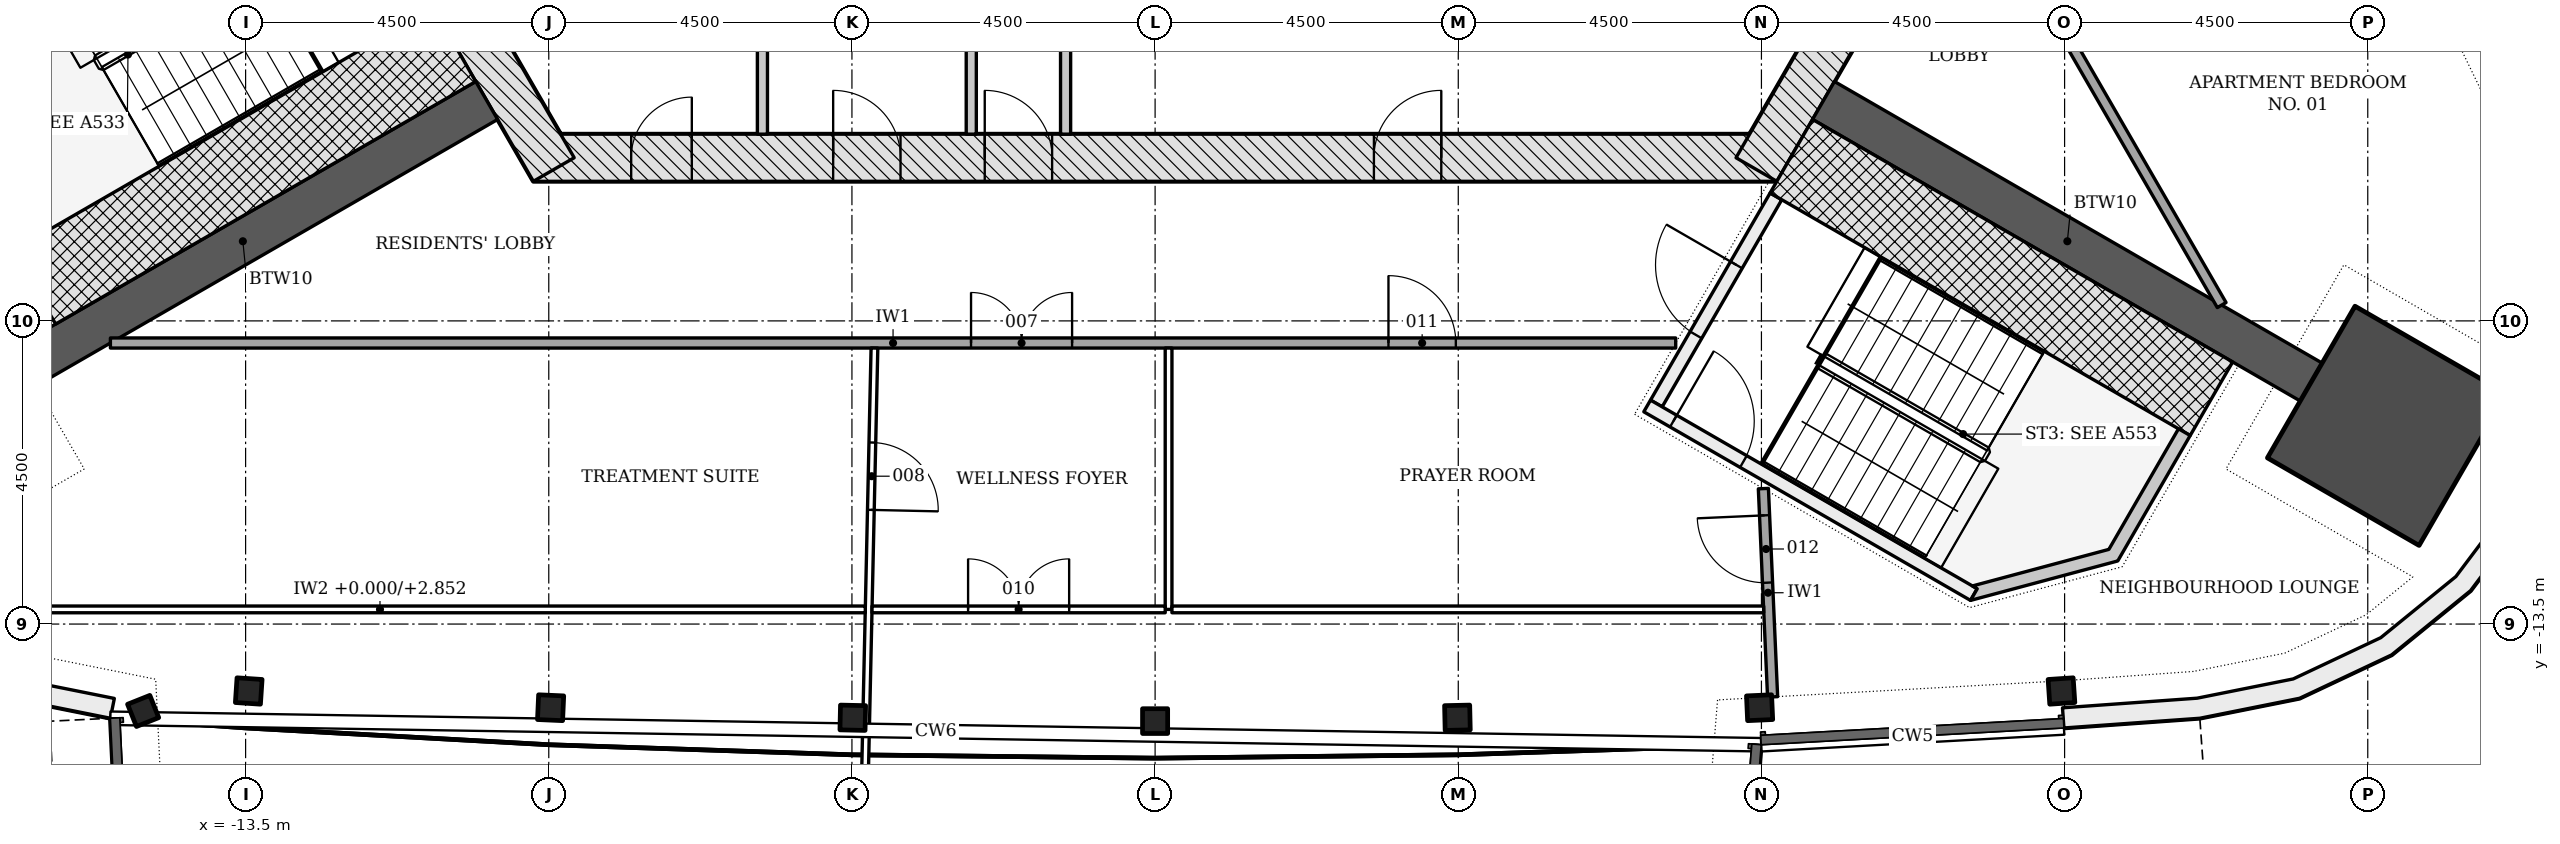
"""IFC4 building model, lengths in metres.
Left out: names, types, materials, properties, quantities, classifications, styles, units other than length and angle.
Written with IfcOpenShell. Run it as: python <this file> out.ifc"""

import sys

from ifc_helpers import new_model, si_unit, direction, frame, frame_2d, origin, origin_2d, place, context, subcontext, project, spatial, polyline, rectangle, hollow_rectangle, i_section, outline, extrude, element, fill, save


model = new_model("IFC4")
c1 = context("Model", 3, precision=1e-05, world=origin(), true_north=direction((0.0, 1.0)))
c2 = subcontext(c1, "Body", "Model", "MODEL_VIEW")
j1 = project(units=[si_unit("LENGTHUNIT", "METRE"), si_unit("PLANEANGLEUNIT", "RADIAN")], contexts=[c1])
p1 = place(None, origin())
s1 = spatial("IfcSite", under=j1, at=p1, CompositionType="ELEMENT")
p2 = place(p1, origin())
s2 = spatial("IfcBuilding", under=s1, at=p2, CompositionType="ELEMENT")
p3 = place(p2, frame((0.0, 0.0, 214.8)))
s3 = spatial("IfcBuildingStorey", under=s2, at=p3, CompositionType="ELEMENT", Elevation=214.8)
p4 = place(p3, frame((-9.229, -6.578, -0.2), z_axis=(0.0, 0.0, 1.0), x_axis=(1.0, 0.0, 0.0)))
e1 = element("IfcWall", 1, at=p4, inside=s3, PredefinedType="SHEAR", context=c2, shape_type="SweptSolid", body=[
    extrude(rectangle(XDim=18.458, YDim=0.7, at=frame_2d((9.229, 0.0))), origin(), (0.0, 0.0, 1.0), 3.6),
])
p5 = place(p4, frame((6.7, 0.0, 0.2)))
e2 = element("IfcOpeningElement", 2, at=p5, cuts=e1, PredefinedType="OPENING", context=c2, shape_type="SweptSolid", body=[
    extrude(rectangle(XDim=1.0, YDim=2.1, at=frame_2d((0.5, 1.05))), frame((0.0, 0.36, 0.0), z_axis=(0.0, -1.0, 0.0), x_axis=(1.0, 0.0, 0.0)), (0.0, 0.0, 1.0), 0.72),
])
p6 = place(p4, frame((1.452, 0.0, 0.2)))
e3 = element("IfcOpeningElement", 3, at=p6, cuts=e1, PredefinedType="OPENING", context=c2, shape_type="SweptSolid", body=[
    extrude(rectangle(XDim=0.9, YDim=2.1, at=frame_2d((0.45, 1.05))), frame((0.0, 0.36, 0.0), z_axis=(0.0, -1.0, 0.0), x_axis=(1.0, 0.0, 0.0)), (0.0, 0.0, 1.0), 0.72),
])
p7 = place(p4, frame((4.45, 0.0, 0.2)))
e4 = element("IfcOpeningElement", 4, at=p7, cuts=e1, PredefinedType="OPENING", context=c2, shape_type="SweptSolid", body=[
    extrude(rectangle(XDim=1.0, YDim=2.1, at=frame_2d((0.5, 1.05))), frame((0.0, 0.36, 0.0), z_axis=(0.0, -1.0, 0.0), x_axis=(1.0, 0.0, 0.0)), (0.0, 0.0, 1.0), 0.72),
])
p8 = place(p4, frame((12.477, 0.0, 0.2)))
e5 = element("IfcOpeningElement", 5, at=p8, cuts=e1, PredefinedType="OPENING", context=c2, shape_type="SweptSolid", body=[
    extrude(rectangle(XDim=1.0, YDim=2.1, at=frame_2d((0.5, 1.05))), frame((0.0, 0.36, 0.0), z_axis=(0.0, -1.0, 0.0), x_axis=(1.0, 0.0, 0.0)), (0.0, 0.0, 1.0), 0.72),
])
for number, where, z_axis, x_axis in (
    (6, (8.926, -6.753, -0.2), (0.0, 0.0, 1.0), (0.5, 0.866, 0.0)),
    (7, (-10.311, -4.353, -0.2), (0.0, 0.0, 1.0), (0.5, -0.866, 0.0)),
):
    element("IfcWall", number, at=place(p3, frame(where, z_axis=z_axis, x_axis=x_axis)), inside=s3, PredefinedType="SHEAR", context=c2, shape_type="SweptSolid", body=[
        extrude(rectangle(XDim=2.771, YDim=0.7, at=frame_2d((1.386, 0.0))), origin(), (0.0, 0.0, 1.0), 3.6),
    ])
for number, where, z_axis, x_axis in (
    (8, (-9.922, -5.728, -0.2), (0.0, 0.0, 1.0), (-0.866, -0.5, 0.0)),
    (9, (9.922, -5.728, -0.2), (0.0, 0.0, 1.0), (0.866, -0.5, 0.0)),
):
    element("IfcWall", number, at=place(p3, frame(where, z_axis=z_axis, x_axis=x_axis)), inside=s3, PredefinedType="SHEAR", context=c2, shape_type="SweptSolid", body=[
        extrude(rectangle(XDim=8.359, YDim=0.65, at=frame_2d((4.179, 0.0))), origin(), (0.0, 0.0, 1.0), 3.6),
    ])
p9 = place(p3, frame((18.286, -10.558, -0.2), z_axis=(0.0, 0.0, 1.0), x_axis=(0.866025403784, -0.5, 0.0)))
e10 = element("IfcColumn", 10, at=p9, inside=s3, PredefinedType="COLUMN", context=c2, shape_type="SweptSolid", body=[
    extrude(rectangle(XDim=2.6, YDim=2.6, at=origin_2d()), origin(), (0.0, 0.0, 1.0), 3.6),
])
for number, where, z_axis, x_axis in (
    (11, (-13.454, -14.494, -0.2), (0.0, 0.0, 1.0), (0.998, -0.066, 0.0)),
    (12, (-8.973, -14.742, -0.2), (0.0, 0.0, 1.0), (0.999, -0.044, 0.0)),
    (13, (-4.488, -14.891, -0.2), (0.0, 0.0, 1.0), (1.0, -0.022, 0.0)),
    (14, (0.0, -14.94, -0.2), (0.0, 0.0, 1.0), (1.0, 0.0, 0.0)),
    (15, (4.488, -14.891, -0.2), (0.0, 0.0, 1.0), (1.0, 0.022, 0.0)),
    (16, (8.973, -14.742, -0.2), (0.0, 0.0, 1.0), (0.999, 0.044, 0.0)),
    (17, (13.454, -14.494, -0.2), (0.0, 0.0, 1.0), (0.998, 0.066, 0.0)),
):
    element("IfcColumn", number, at=place(p3, frame(where, z_axis=z_axis, x_axis=x_axis)), inside=s3, PredefinedType="COLUMN", context=c2, shape_type="SweptSolid", body=[
        extrude(i_section(OverallWidth=0.373, OverallDepth=0.368, WebThickness=0.015, FlangeThickness=0.024, FilletRadius=0.015, at=origin_2d()), origin(), (0.0, 0.0, 1.0), 3.6),
    ])
p10 = place(p3, frame((-15.021, -14.79, -0.2), z_axis=(0.0, 0.0, 1.0), x_axis=(0.370053104001, -0.929010602856, 0.0)))
e18 = element("IfcColumn", 18, at=p10, inside=s3, PredefinedType="COLUMN", context=c2, shape_type="SweptSolid", body=[
    extrude(hollow_rectangle(XDim=0.356, YDim=0.356, WallThickness=0.013, at=origin_2d()), origin(), (0.0, 0.0, 1.0), 3.6),
])
p11 = place(p3, origin())
e19 = element("IfcWall", 19, at=p11, inside=s3, PredefinedType="NOTDEFINED", context=c2, shape_type="SweptSolid", body=[
    extrude(outline(polyline([(-18.354, -13.958), (-16.988, -14.602), (-15.507, -14.898), (-15.448, -14.604), (-16.893, -14.315), (-18.227, -13.686), (-18.354, -13.958)])), origin(), (0.0, 0.0, 1.0), 3.3),
])
p12 = place(p3, origin())
e20 = element("IfcWall", 20, at=p12, inside=s3, PredefinedType="NOTDEFINED", context=c2, shape_type="SweptSolid", body=[
    extrude(outline(polyline([(13.49, -15.042), (15.507, -14.898), (16.988, -14.602), (18.354, -13.958), (19.526, -13.004), (20.434, -11.797), (21.025, -10.408), (21.265, -8.917), (21.139, -7.411), (20.656, -5.98), (19.772, -4.162), (19.502, -4.293), (20.378, -6.094), (20.844, -7.473), (20.963, -8.905), (20.735, -10.324), (20.172, -11.646), (19.308, -12.795), (18.193, -13.702), (16.893, -14.315), (15.467, -14.6), (13.469, -14.743), (13.49, -15.042)])), origin(), (0.0, 0.0, 1.0), 3.3),
])
p13 = place(p3, frame((-5.829, -3.492, 0.0), z_axis=(0.0, 0.0, 1.0), x_axis=(0.0, -1.0, 0.0)))
e21 = element("IfcWall", 21, at=p13, inside=s3, PredefinedType="PARTITIONING", context=c2, shape_type="SweptSolid", body=[
    extrude(rectangle(XDim=2.736, YDim=0.15, at=frame_2d((1.368, 0.0))), origin(), (0.0, 0.0, 1.0), 3.4),
])
p14 = place(p3, frame((-2.729, 1.3, 0.0), z_axis=(0.0, 0.0, 1.0), x_axis=(0.0, -1.0, 0.0)))
e22 = element("IfcWall", 22, at=p14, inside=s3, PredefinedType="PARTITIONING", context=c2, shape_type="SweptSolid", body=[
    extrude(rectangle(XDim=7.528, YDim=0.15, at=frame_2d((3.764, 0.0))), origin(), (0.0, 0.0, 1.0), 3.4),
])
p15 = place(p14, frame((1.915, 0.0, 0.0)))
e23 = element("IfcOpeningElement", 23, at=p15, cuts=e22, PredefinedType="OPENING", context=c2, shape_type="SweptSolid", body=[
    extrude(rectangle(XDim=0.9, YDim=2.1, at=frame_2d((0.45, 1.05))), frame((0.0, 0.085, 0.0), z_axis=(0.0, -1.0, 0.0), x_axis=(1.0, 0.0, 0.0)), (0.0, 0.0, 1.0), 0.17),
])
p16 = place(p3, frame((-1.329, 1.597, 0.0), z_axis=(0.0, 0.0, 1.0), x_axis=(0.0, -1.0, 0.0)))
e24 = element("IfcWall", 24, at=p16, inside=s3, PredefinedType="PARTITIONING", context=c2, shape_type="SweptSolid", body=[
    extrude(rectangle(XDim=7.825, YDim=0.15, at=frame_2d((3.913, 0.0))), origin(), (0.0, 0.0, 1.0), 3.4),
])
p17 = place(p16, frame((2.063, 0.0, 0.0)))
e25 = element("IfcOpeningElement", 25, at=p17, cuts=e24, PredefinedType="OPENING", context=c2, shape_type="SweptSolid", body=[
    extrude(rectangle(XDim=0.9, YDim=2.1, at=frame_2d((0.45, 1.05))), frame((0.0, 0.085, 0.0), z_axis=(0.0, -1.0, 0.0), x_axis=(1.0, 0.0, 0.0)), (0.0, 0.0, 1.0), 0.17),
])
p18 = place(p3, frame((-10.399, -4.901, -0.2), z_axis=(0.0, 0.0, 1.0), x_axis=(-0.866018442252, -0.500012057535, 0.0)))
e26 = element("IfcWall", 26, at=p18, inside=s3, PredefinedType="SHEAR", context=c2, shape_type="SweptSolid", body=[
    extrude(rectangle(XDim=7.2, YDim=1.261, at=frame_2d((3.6, 0.0))), origin(), (0.0, 0.0, 1.0), 3.6),
])
p19 = place(p3, frame((7.44, -10.226, -0.2), z_axis=(0.0, 0.0, 1.0), x_axis=(0.500022077904, 0.866012656725, 0.0)))
e27 = element("IfcWall", 27, at=p19, inside=s3, PredefinedType="SHEAR", context=c2, shape_type="SweptSolid", body=[
    extrude(rectangle(XDim=3.55, YDim=0.2, at=frame_2d((1.775, 0.0))), origin(), (0.0, 0.0, 1.0), 3.6),
])
p20 = place(p19, frame((1.175, 0.0, 0.2)))
e28 = element("IfcOpeningElement", 28, at=p20, cuts=e27, PredefinedType="OPENING", context=c2, shape_type="SweptSolid", body=[
    extrude(rectangle(XDim=1.2, YDim=2.1, at=frame_2d((0.6, 1.05))), frame((0.0, 0.11, 0.0), z_axis=(0.0, -1.0, 0.0), x_axis=(1.0, 0.0, 0.0)), (0.0, 0.0, 1.0), 0.22),
])
p21 = place(p3, frame((7.304, -10.262, -0.2), z_axis=(0.0, 0.0, 1.0), x_axis=(0.866026594901, -0.49999793692, 0.0)))
e29 = element("IfcWall", 29, at=p21, inside=s3, PredefinedType="SHEAR", context=c2, shape_type="SweptSolid", body=[
    extrude(rectangle(XDim=5.6, YDim=0.2, at=frame_2d((2.8, 0.0))), origin(), (0.0, 0.0, 1.0), 3.6),
])
p22 = place(p21, frame((0.45, 0.0, 0.2)))
e30 = element("IfcOpeningElement", 30, at=p22, cuts=e29, PredefinedType="OPENING", context=c2, shape_type="SweptSolid", body=[
    extrude(rectangle(XDim=1.2, YDim=2.1, at=frame_2d((0.6, 1.05))), frame((0.0, 0.11, 0.0), z_axis=(0.0, -1.0, 0.0), x_axis=(1.0, 0.0, 0.0)), (0.0, 0.0, 1.0), 0.22),
])
p23 = place(p3, frame((9.444, -6.555, -0.2), z_axis=(0.0, 0.0, 1.0), x_axis=(0.866018442252, -0.500012057535, 0.0)))
e31 = element("IfcWall", 31, at=p23, inside=s3, PredefinedType="SHEAR", context=c2, shape_type="SweptSolid", body=[
    extrude(rectangle(XDim=7.2, YDim=1.261, at=frame_2d((3.6, 0.0))), origin(), (0.0, 0.0, 1.0), 3.6),
])
p24 = place(p3, frame((0.0, 0.0, -0.2)))
e32 = element("IfcWall", 32, at=p24, inside=s3, PredefinedType="SHEAR", context=c2, shape_type="SweptSolid", body=[
    extrude(outline(polyline([(12.104, -13.149), (14.289, -12.563), (15.364, -10.701), (15.191, -10.601), (14.157, -12.392), (12.132, -12.934), (12.204, -12.976), (12.204, -12.976), (12.204, -12.976), (12.204, -12.976), (12.204, -12.976), (12.204, -12.976), (12.204, -12.976), (12.204, -12.976), (12.204, -12.976), (12.204, -12.976), (12.204, -12.976), (12.204, -12.976), (12.204, -12.976), (12.204, -12.976), (12.204, -12.976), (12.204, -12.976), (12.204, -12.976), (12.104, -13.149)])), origin(), (0.0, 0.0, 1.0), 3.6),
])
p25 = place(p3, frame((15.832, -8.765, 0.0), z_axis=(0.0, 0.0, 1.0), x_axis=(-0.500005035328, 0.866022496617, 0.0)))
e33 = element("IfcWall", 33, at=p25, inside=s3, PredefinedType="PARTITIONING", context=c2, shape_type="SweptSolid", body=[
    extrude(rectangle(XDim=11.343, YDim=0.15, at=frame_2d((5.671, 0.0))), origin(), (0.0, 0.0, 1.0), 2.852),
])
p26 = place(p3, frame((-15.507, -9.328, 0.0), z_axis=(0.0, 0.0, 1.0), x_axis=(1.0, 0.0, 0.0)))
e34 = element("IfcWall", 34, at=p26, inside=s3, PredefinedType="PARTITIONING", context=c2, shape_type="SweptSolid", body=[
    extrude(rectangle(XDim=23.234, YDim=0.15, at=frame_2d((11.617, 0.0))), origin(), (0.0, 0.0, 1.0), 2.852),
])
p27 = place(p26, frame((12.775, 0.0, 0.0)))
e35 = element("IfcOpeningElement", 35, at=p27, cuts=e34, PredefinedType="OPENING", context=c2, shape_type="SweptSolid", body=[
    extrude(rectangle(XDim=1.5, YDim=2.1, at=frame_2d((0.75, 1.05))), frame((0.0, 0.085, 0.0), z_axis=(0.0, -1.0, 0.0), x_axis=(1.0, 0.0, 0.0)), (0.0, 0.0, 1.0), 0.17),
])
p28 = place(p26, frame((18.971, 0.0, 0.0)))
e36 = element("IfcOpeningElement", 36, at=p28, cuts=e34, PredefinedType="OPENING", context=c2, shape_type="SweptSolid", body=[
    extrude(rectangle(XDim=1.0, YDim=2.1, at=frame_2d((0.5, 1.05))), frame((0.0, 0.085, 0.0), z_axis=(0.0, -1.0, 0.0), x_axis=(1.0, 0.0, 0.0)), (0.0, 0.0, 1.0), 0.17),
])
p29 = place(p3, frame((9.166, -14.581, 0.0), z_axis=(0.0, 0.0, 1.0), x_axis=(-0.044258886008, 0.999020095398, 0.0)))
e37 = element("IfcWall", 37, at=p29, inside=s3, PredefinedType="PARTITIONING", context=c2, shape_type="SweptSolid", body=[
    extrude(rectangle(XDim=3.094, YDim=0.15, at=frame_2d((1.547, 0.0))), origin(), (0.0, 0.0, 1.0), 3.4),
])
p30 = place(p29, frame((1.697, 0.0, 0.0)))
e38 = element("IfcOpeningElement", 38, at=p30, cuts=e37, PredefinedType="OPENING", context=c2, shape_type="SweptSolid", body=[
    extrude(rectangle(XDim=1.0, YDim=2.1, at=frame_2d((0.5, 1.05))), frame((0.0, 0.085, 0.0), z_axis=(0.0, -1.0, 0.0), x_axis=(1.0, 0.0, 0.0)), (0.0, 0.0, 1.0), 0.17),
])
p31 = place(p3, frame((-4.166, -9.403, 0.0), z_axis=(0.0, 0.0, 1.0), x_axis=(-0.022131761569, -0.999755062568, 0.0)))
e39 = element("IfcWall", 39, at=p31, inside=s3, PredefinedType="PARTITIONING", context=c2, shape_type="SweptSolid", body=[
    extrude(rectangle(XDim=21.952, YDim=0.1, at=frame_2d((10.976, 0.0))), origin(), (0.0, 0.0, 1.0), 2.847),
])
p32 = place(p31, frame((1.403, 0.0, 0.0)))
e40 = element("IfcOpeningElement", 40, at=p32, cuts=e39, PredefinedType="OPENING", context=c2, shape_type="SweptSolid", body=[
    extrude(rectangle(XDim=1.0, YDim=2.1, at=frame_2d((0.5, 1.05))), frame((0.0, 0.06, 0.0), z_axis=(0.0, -1.0, 0.0), x_axis=(1.0, 0.0, 0.0)), (0.0, 0.0, 1.0), 0.12),
])
p33 = place(p31, frame((11.859, 0.0, 0.0)))
e41 = element("IfcOpeningElement", 41, at=p33, cuts=e39, PredefinedType="OPENING", context=c2, shape_type="SweptSolid", body=[
    extrude(rectangle(XDim=1.5, YDim=2.1, at=frame_2d((0.75, 1.05))), frame((0.0, 0.06, 0.0), z_axis=(0.0, -1.0, 0.0), x_axis=(1.0, 0.0, 0.0)), (0.0, 0.0, 1.0), 0.12),
])
p34 = place(p3, frame((0.2, -9.403, 0.0), z_axis=(0.0, 0.0, 1.0), x_axis=(0.0, -1.0, 0.0)))
e42 = element("IfcWall", 42, at=p34, inside=s3, PredefinedType="PARTITIONING", context=c2, shape_type="SweptSolid", body=[
    extrude(rectangle(XDim=3.879, YDim=0.1, at=frame_2d((1.939, 0.0))), origin(), (0.0, 0.0, 1.0), 3.4),
])
p35 = place(p3, frame((-18.709, -13.282, 0.0), z_axis=(0.0, 0.0, 1.0), x_axis=(1.0, 0.0, 0.0)))
e43 = element("IfcWall", 43, at=p35, inside=s3, PredefinedType="PARTITIONING", context=c2, shape_type="SweptSolid", body=[
    extrude(rectangle(XDim=14.407, YDim=0.1, at=frame_2d((7.204, 0.0))), origin(), (0.0, 0.0, 1.0), 2.852),
])
p36 = place(p3, frame((-4.202, -13.282, 0.0), z_axis=(0.0, 0.0, 1.0), x_axis=(1.0, 0.0, 0.0)))
e44 = element("IfcWall", 44, at=p36, inside=s3, PredefinedType="PARTITIONING", context=c2, shape_type="SweptSolid", body=[
    extrude(rectangle(XDim=4.352, YDim=0.1, at=frame_2d((2.176, 0.0))), origin(), (0.0, 0.0, 1.0), 2.852),
])
p37 = place(p36, frame((1.426, 0.0, 0.0)))
e45 = element("IfcOpeningElement", 45, at=p37, cuts=e44, PredefinedType="OPENING", context=c2, shape_type="SweptSolid", body=[
    extrude(rectangle(XDim=1.5, YDim=2.1, at=frame_2d((0.75, 1.05))), frame((0.0, 0.06, 0.0), z_axis=(0.0, -1.0, 0.0), x_axis=(1.0, 0.0, 0.0)), (0.0, 0.0, 1.0), 0.12),
])
p38 = place(p3, frame((0.25, -13.282, 0.0), z_axis=(0.0, 0.0, 1.0), x_axis=(1.0, 0.0, 0.0)))
e46 = element("IfcWall", 46, at=p38, inside=s3, PredefinedType="PARTITIONING", context=c2, shape_type="SweptSolid", body=[
    extrude(rectangle(XDim=8.783, YDim=0.1, at=frame_2d((4.392, 0.0))), origin(), (0.0, 0.0, 1.0), 2.852),
])
p39 = place(p5, origin())
e47 = element("IfcDoor", 47, at=p39, inside=s3, OperationType="SINGLE_SWING_LEFT", PredefinedType="DOOR", context=c2, shape_type="SweptSolid", body=[
    extrude(rectangle(XDim=1.0, YDim=2.1, at=frame_2d((0.5, 1.05))), frame((0.0, 0.075, 0.0), z_axis=(0.0, -1.0, 0.0), x_axis=(1.0, 0.0, 0.0)), (0.0, 0.0, 1.0), 0.15),
])
fill(e2, e47)
p40 = place(p6, origin())
e48 = element("IfcDoor", 48, at=p40, inside=s3, OperationType="SINGLE_SWING_RIGHT", PredefinedType="DOOR", context=c2, shape_type="SweptSolid", body=[
    extrude(rectangle(XDim=0.9, YDim=2.1, at=frame_2d((0.45, 1.05))), frame((0.0, 0.075, 0.0), z_axis=(0.0, -1.0, 0.0), x_axis=(1.0, 0.0, 0.0)), (0.0, 0.0, 1.0), 0.15),
])
fill(e3, e48)
p41 = place(p7, origin())
e49 = element("IfcDoor", 49, at=p41, inside=s3, OperationType="SINGLE_SWING_LEFT", PredefinedType="DOOR", context=c2, shape_type="SweptSolid", body=[
    extrude(rectangle(XDim=1.0, YDim=2.1, at=frame_2d((0.5, 1.05))), frame((0.0, 0.075, 0.0), z_axis=(0.0, -1.0, 0.0), x_axis=(1.0, 0.0, 0.0)), (0.0, 0.0, 1.0), 0.15),
])
fill(e4, e49)
p42 = place(p8, origin())
e50 = element("IfcDoor", 50, at=p42, inside=s3, OperationType="SINGLE_SWING_RIGHT", PredefinedType="DOOR", context=c2, shape_type="SweptSolid", body=[
    extrude(rectangle(XDim=1.0, YDim=2.1, at=frame_2d((0.5, 1.05))), frame((0.0, 0.075, 0.0), z_axis=(0.0, -1.0, 0.0), x_axis=(1.0, 0.0, 0.0)), (0.0, 0.0, 1.0), 0.15),
])
fill(e5, e50)
p43 = place(p20, origin())
e51 = element("IfcDoor", 51, at=p43, inside=s3, OperationType="SINGLE_SWING_RIGHT", PredefinedType="DOOR", context=c2, shape_type="SweptSolid", body=[
    extrude(rectangle(XDim=1.2, YDim=2.1, at=frame_2d((0.6, 1.05))), frame((0.0, 0.025, 0.0), z_axis=(0.0, -1.0, 0.0), x_axis=(1.0, 0.0, 0.0)), (0.0, 0.0, 1.0), 0.05),
])
fill(e28, e51)
p44 = place(p22, origin())
e52 = element("IfcDoor", 52, at=p44, inside=s3, OperationType="SINGLE_SWING_LEFT", PredefinedType="DOOR", context=c2, shape_type="SweptSolid", body=[
    extrude(rectangle(XDim=1.2, YDim=2.1, at=frame_2d((0.6, 1.05))), frame((0.0, 0.025, 0.0), z_axis=(0.0, -1.0, 0.0), x_axis=(1.0, 0.0, 0.0)), (0.0, 0.0, 1.0), 0.05),
])
fill(e30, e52)
p45 = place(p27, origin())
e53 = element("IfcDoor", 53, at=p45, inside=s3, OperationType="DOUBLE_DOOR_SINGLE_SWING", PredefinedType="DOOR", context=c2, shape_type="SweptSolid", body=[
    extrude(rectangle(XDim=1.5, YDim=2.1, at=frame_2d((0.75, 1.05))), frame((0.0, 0.025, 0.0), z_axis=(0.0, -1.0, 0.0), x_axis=(1.0, 0.0, 0.0)), (0.0, 0.0, 1.0), 0.05),
])
fill(e35, e53)
p46 = place(p32, origin())
e54 = element("IfcDoor", 54, at=p46, inside=s3, OperationType="SINGLE_SWING_RIGHT", PredefinedType="DOOR", context=c2, shape_type="SweptSolid", body=[
    extrude(rectangle(XDim=1.0, YDim=2.1, at=frame_2d((0.5, 1.05))), frame((0.0, 0.025, 0.0), z_axis=(0.0, -1.0, 0.0), x_axis=(1.0, 0.0, 0.0)), (0.0, 0.0, 1.0), 0.05),
])
fill(e40, e54)
p47 = place(p37, origin())
e55 = element("IfcDoor", 55, at=p47, inside=s3, OperationType="DOUBLE_DOOR_SINGLE_SWING", PredefinedType="DOOR", context=c2, shape_type="SweptSolid", body=[
    extrude(rectangle(XDim=1.5, YDim=2.1, at=frame_2d((0.75, 1.05))), frame((0.0, 0.025, 0.0), z_axis=(0.0, -1.0, 0.0), x_axis=(1.0, 0.0, 0.0)), (0.0, 0.0, 1.0), 0.05),
])
fill(e45, e55)
p48 = place(p28, origin())
e56 = element("IfcDoor", 56, at=p48, inside=s3, OperationType="SINGLE_SWING_LEFT", PredefinedType="DOOR", context=c2, shape_type="SweptSolid", body=[
    extrude(rectangle(XDim=1.0, YDim=2.1, at=frame_2d((0.5, 1.05))), frame((0.0, 0.025, 0.0), z_axis=(0.0, -1.0, 0.0), x_axis=(1.0, 0.0, 0.0)), (0.0, 0.0, 1.0), 0.05),
])
fill(e36, e56)
p49 = place(p30, origin())
e57 = element("IfcDoor", 57, at=p49, inside=s3, OperationType="SINGLE_SWING_RIGHT", PredefinedType="DOOR", context=c2, shape_type="SweptSolid", body=[
    extrude(rectangle(XDim=1.0, YDim=2.1, at=frame_2d((0.5, 1.05))), frame((0.0, 0.025, 0.0), z_axis=(0.0, -1.0, 0.0), x_axis=(1.0, 0.0, 0.0)), (0.0, 0.0, 1.0), 0.05),
])
fill(e38, e57)
save(model, sys.argv[1])
